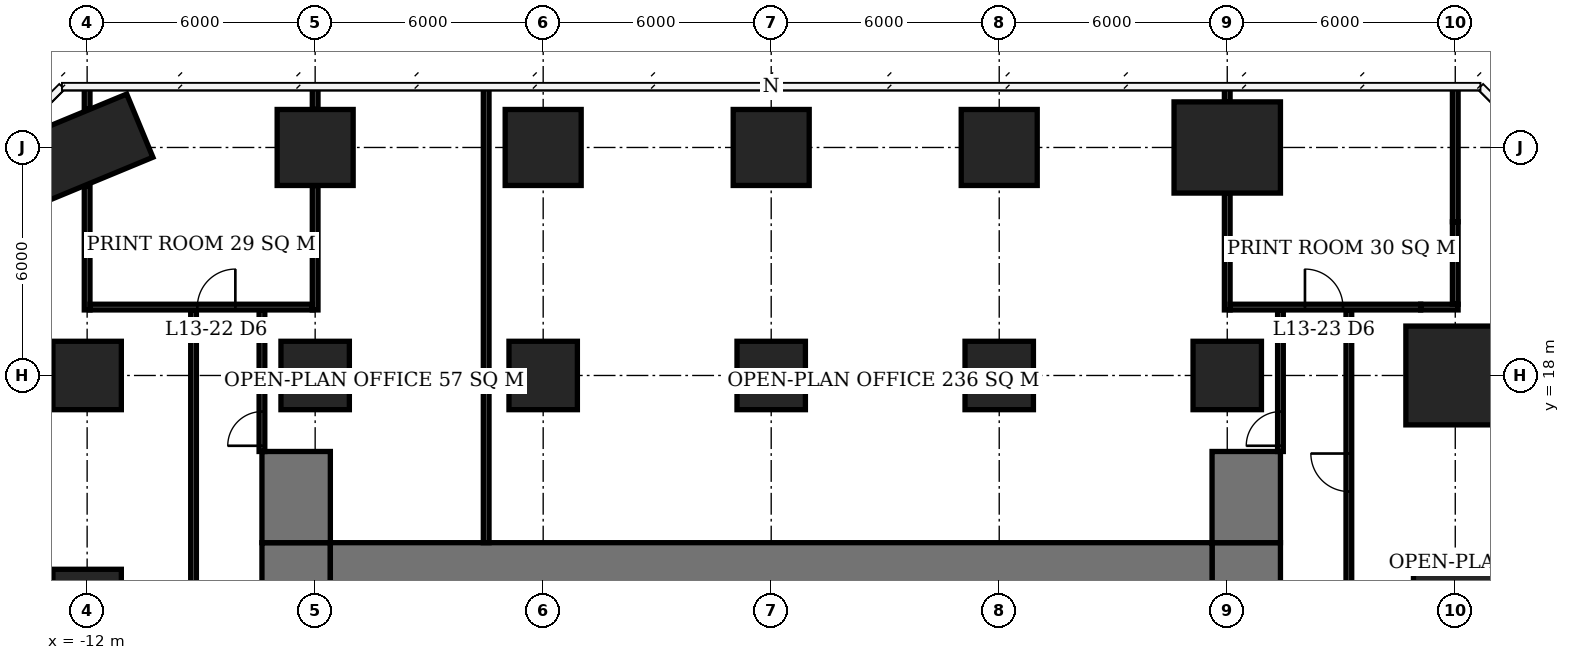
"""IFC4 building model, lengths in metres.
Left out: names, types, materials, properties, quantities, classifications, styles, units other than length and angle.
Written with IfcOpenShell. Run it as: python <this file> out.ifc"""

import sys

from ifc_helpers import new_model, si_unit, direction, frame, frame_2d, origin, origin_2d, place, context, subcontext, project, spatial, rectangle, extrude, element, fill, save


model = new_model("IFC4")
c1 = context("Model", 3, precision=1e-05, world=origin(), true_north=direction((0.0, 1.0)))
c2 = subcontext(c1, "Body", "Model", "MODEL_VIEW")
j1 = project(units=[si_unit("LENGTHUNIT", "METRE"), si_unit("PLANEANGLEUNIT", "RADIAN")], contexts=[c1])
p1 = place(None, origin())
s1 = spatial("IfcSite", under=j1, at=p1, CompositionType="ELEMENT")
p2 = place(p1, origin())
s2 = spatial("IfcBuilding", under=s1, at=p2, CompositionType="ELEMENT")
p3 = place(p2, frame((0.0, 0.0, 57.2)))
s3 = spatial("IfcBuildingStorey", under=s2, at=p3, CompositionType="ELEMENT", Elevation=57.2)
for number, where, z_axis, x_axis in (
    (1, (-12.0, 12.0, 0.0), (0.0, 0.0, 1.0), (1.0, 0.0, 0.0)),
    (2, (-12.0, 18.0, 0.0), (0.0, 0.0, 1.0), (1.0, 0.0, 0.0)),
):
    element("IfcColumn", number, at=place(p3, frame(where, z_axis=z_axis, x_axis=x_axis)), inside=s3, PredefinedType="COLUMN", context=c2, shape_type="SweptSolid", body=[
        extrude(rectangle(XDim=1.8, YDim=1.8, at=origin_2d()), origin(), (0.0, 0.0, 1.0), 3.9),
    ])
p4 = place(p3, frame((-12.0, 24.0, 0.0), z_axis=(0.0, 0.0, 1.0), x_axis=(0.923879532511, 0.382683432365, 0.0)))
e3 = element("IfcColumn", 3, at=p4, inside=s3, PredefinedType="COLUMN", context=c2, shape_type="SweptSolid", body=[
    extrude(rectangle(XDim=3.0, YDim=1.8, at=origin_2d()), origin(), (0.0, 0.0, 1.0), 3.9),
])
p5 = place(p3, frame((-6.0, 18.0, 0.0), z_axis=(0.0, 0.0, 1.0), x_axis=(1.0, 0.0, 0.0)))
e4 = element("IfcColumn", 4, at=p5, inside=s3, PredefinedType="COLUMN", context=c2, shape_type="SweptSolid", body=[
    extrude(rectangle(XDim=1.8, YDim=1.8, at=origin_2d()), origin(), (0.0, 0.0, 1.0), 3.9),
])
p6 = place(p3, frame((-6.0, 24.0, 0.0), z_axis=(0.0, 0.0, 1.0), x_axis=(1.0, 0.0, 0.0)))
e5 = element("IfcColumn", 5, at=p6, inside=s3, PredefinedType="COLUMN", context=c2, shape_type="SweptSolid", body=[
    extrude(rectangle(XDim=2.0, YDim=2.0, at=origin_2d()), origin(), (0.0, 0.0, 1.0), 3.9),
])
p7 = place(p3, frame((0.0, 18.0, 0.0), z_axis=(0.0, 0.0, 1.0), x_axis=(1.0, 0.0, 0.0)))
e6 = element("IfcColumn", 6, at=p7, inside=s3, PredefinedType="COLUMN", context=c2, shape_type="SweptSolid", body=[
    extrude(rectangle(XDim=1.8, YDim=1.8, at=origin_2d()), origin(), (0.0, 0.0, 1.0), 3.9),
])
p8 = place(p3, frame((0.0, 24.0, 0.0), z_axis=(0.0, 0.0, 1.0), x_axis=(1.0, 0.0, 0.0)))
e7 = element("IfcColumn", 7, at=p8, inside=s3, PredefinedType="COLUMN", context=c2, shape_type="SweptSolid", body=[
    extrude(rectangle(XDim=2.0, YDim=2.0, at=origin_2d()), origin(), (0.0, 0.0, 1.0), 3.9),
])
p9 = place(p3, frame((6.0, 18.0, 0.0), z_axis=(0.0, 0.0, 1.0), x_axis=(1.0, 0.0, 0.0)))
e8 = element("IfcColumn", 8, at=p9, inside=s3, PredefinedType="COLUMN", context=c2, shape_type="SweptSolid", body=[
    extrude(rectangle(XDim=1.8, YDim=1.8, at=origin_2d()), origin(), (0.0, 0.0, 1.0), 3.9),
])
p10 = place(p3, frame((6.0, 24.0, 0.0), z_axis=(0.0, 0.0, 1.0), x_axis=(1.0, 0.0, 0.0)))
e9 = element("IfcColumn", 9, at=p10, inside=s3, PredefinedType="COLUMN", context=c2, shape_type="SweptSolid", body=[
    extrude(rectangle(XDim=2.0, YDim=2.0, at=origin_2d()), origin(), (0.0, 0.0, 1.0), 3.9),
])
p11 = place(p3, frame((12.0, 18.0, 0.0), z_axis=(0.0, 0.0, 1.0), x_axis=(1.0, 0.0, 0.0)))
e10 = element("IfcColumn", 10, at=p11, inside=s3, PredefinedType="COLUMN", context=c2, shape_type="SweptSolid", body=[
    extrude(rectangle(XDim=1.8, YDim=1.8, at=origin_2d()), origin(), (0.0, 0.0, 1.0), 3.9),
])
p12 = place(p3, frame((12.0, 24.0, 0.0), z_axis=(0.0, 0.0, 1.0), x_axis=(1.0, 0.0, 0.0)))
e11 = element("IfcColumn", 11, at=p12, inside=s3, PredefinedType="COLUMN", context=c2, shape_type="SweptSolid", body=[
    extrude(rectangle(XDim=2.0, YDim=2.0, at=origin_2d()), origin(), (0.0, 0.0, 1.0), 3.9),
])
p13 = place(p3, frame((18.0, 18.0, 0.0), z_axis=(0.0, 0.0, 1.0), x_axis=(1.0, 0.0, 0.0)))
e12 = element("IfcColumn", 12, at=p13, inside=s3, PredefinedType="COLUMN", context=c2, shape_type="SweptSolid", body=[
    extrude(rectangle(XDim=1.8, YDim=1.8, at=origin_2d()), origin(), (0.0, 0.0, 1.0), 3.9),
])
p14 = place(p3, frame((18.0, 24.0, 0.0), z_axis=(0.0, 0.0, 1.0), x_axis=(1.0, 0.0, 0.0)))
e13 = element("IfcColumn", 13, at=p14, inside=s3, PredefinedType="COLUMN", context=c2, shape_type="SweptSolid", body=[
    extrude(rectangle(XDim=2.8, YDim=2.4, at=origin_2d()), origin(), (0.0, 0.0, 1.0), 3.9),
])
p15 = place(p3, frame((24.0, 12.0, 0.0), z_axis=(0.0, 0.0, 1.0), x_axis=(1.0, 0.0, 0.0)))
e14 = element("IfcColumn", 14, at=p15, inside=s3, PredefinedType="COLUMN", context=c2, shape_type="SweptSolid", body=[
    extrude(rectangle(XDim=2.2, YDim=2.2, at=origin_2d()), origin(), (0.0, 0.0, 1.0), 3.9),
])
p16 = place(p3, frame((24.0, 18.0, 0.0), z_axis=(0.0, 0.0, 1.0), x_axis=(1.0, 0.0, 0.0)))
e15 = element("IfcColumn", 15, at=p16, inside=s3, PredefinedType="COLUMN", context=c2, shape_type="SweptSolid", body=[
    extrude(rectangle(XDim=2.6, YDim=2.6, at=origin_2d()), origin(), (0.0, 0.0, 1.0), 3.9),
])
p17 = place(p3, frame((-5.6, 12.6, 0.0), z_axis=(0.0, 0.0, 1.0), x_axis=(1.0, 0.0, 0.0)))
e16 = element("IfcWall", 16, at=p17, inside=s3, PredefinedType="SHEAR", context=c2, shape_type="SweptSolid", body=[
    extrude(rectangle(XDim=23.2, YDim=2.0, at=frame_2d((11.6, 0.0))), origin(), (0.0, 0.0, 1.0), 3.9),
])
p18 = place(p3, frame((-6.5, -7.6, 0.0), z_axis=(0.0, 0.0, 1.0), x_axis=(0.0, 1.0, 0.0)))
e17 = element("IfcWall", 17, at=p18, inside=s3, PredefinedType="SHEAR", context=c2, shape_type="SweptSolid", body=[
    extrude(rectangle(XDim=21.2, YDim=1.8, at=frame_2d((10.6, 0.0))), origin(), (0.0, 0.0, 1.0), 3.9),
])
p19 = place(p18, frame((7.8, 0.0, 0.0)))
e18 = element("IfcOpeningElement", 18, at=p19, cuts=e17, PredefinedType="OPENING", context=c2, shape_type="SweptSolid", body=[
    extrude(rectangle(XDim=1.8, YDim=2.4, at=frame_2d((0.9, 1.2))), frame((0.0, 0.91, 0.0), z_axis=(0.0, -1.0, 0.0), x_axis=(1.0, 0.0, 0.0)), (0.0, 0.0, 1.0), 1.82),
])
p20 = place(p3, frame((18.5, -7.6, 0.0), z_axis=(0.0, 0.0, 1.0), x_axis=(0.0, 1.0, 0.0)))
e19 = element("IfcWall", 19, at=p20, inside=s3, PredefinedType="SHEAR", context=c2, shape_type="SweptSolid", body=[
    extrude(rectangle(XDim=21.2, YDim=1.8, at=frame_2d((10.6, 0.0))), origin(), (0.0, 0.0, 1.0), 3.9),
])
p21 = place(p20, frame((9.2, 0.0, 0.0)))
e20 = element("IfcOpeningElement", 20, at=p21, cuts=e19, PredefinedType="OPENING", context=c2, shape_type="SweptSolid", body=[
    extrude(rectangle(XDim=1.8, YDim=2.4, at=frame_2d((0.9, 1.2))), frame((0.0, 0.91, 0.0), z_axis=(0.0, -1.0, 0.0), x_axis=(1.0, 0.0, 0.0)), (0.0, 0.0, 1.0), 1.82),
])
for number, where, z_axis, x_axis in (
    (21, (-6.5, 13.6, 0.0), (0.0, 0.0, 1.0), (0.0, 1.0, 0.0)),
    (22, (18.5, 13.6, 0.0), (0.0, 0.0, 1.0), (0.0, 1.0, 0.0)),
):
    element("IfcWall", number, at=place(p3, frame(where, z_axis=z_axis, x_axis=x_axis)), inside=s3, PredefinedType="SHEAR", context=c2, shape_type="SweptSolid", body=[
        extrude(rectangle(XDim=2.4, YDim=1.8, at=frame_2d((1.2, 0.0))), origin(), (0.0, 0.0, 1.0), 3.9),
    ])
p22 = place(p3, frame((-11.925, 19.8, 0.0), z_axis=(0.0, 0.0, 1.0), x_axis=(1.0, 0.0, 0.0)))
e23 = element("IfcWall", 23, at=p22, inside=s3, PredefinedType="PARTITIONING", context=c2, shape_type="SweptSolid", body=[
    extrude(rectangle(XDim=5.85, YDim=0.15, at=frame_2d((2.925, 0.0))), origin(), (0.0, 0.0, 1.0), 3.65),
])
p23 = place(p22, frame((2.825, 0.0, 0.0)))
e24 = element("IfcOpeningElement", 24, at=p23, cuts=e23, PredefinedType="OPENING", context=c2, shape_type="SweptSolid", body=[
    extrude(rectangle(XDim=1.0, YDim=2.1, at=frame_2d((0.5, 1.05))), frame((0.0, 0.085, 0.0), z_axis=(0.0, -1.0, 0.0), x_axis=(1.0, 0.0, 0.0)), (0.0, 0.0, 1.0), 0.17),
])
p24 = place(p3, frame((18.075, 19.8, 0.0), z_axis=(0.0, 0.0, 1.0), x_axis=(1.0, 0.0, 0.0)))
e25 = element("IfcWall", 25, at=p24, inside=s3, PredefinedType="PARTITIONING", context=c2, shape_type="SweptSolid", body=[
    extrude(rectangle(XDim=5.015, YDim=0.15, at=frame_2d((2.508, 0.0))), origin(), (0.0, 0.0, 1.0), 3.65),
])
p25 = place(p24, frame((1.97, 0.0, 0.0)))
e26 = element("IfcOpeningElement", 26, at=p25, cuts=e25, PredefinedType="OPENING", context=c2, shape_type="SweptSolid", body=[
    extrude(rectangle(XDim=1.0, YDim=2.1, at=frame_2d((0.5, 1.05))), frame((0.0, 0.085, 0.0), z_axis=(0.0, -1.0, 0.0), x_axis=(1.0, 0.0, 0.0)), (0.0, 0.0, 1.0), 0.17),
])
p26 = place(p3, frame((23.09, 19.8, 0.0), z_axis=(0.0, 0.0, 1.0), x_axis=(1.0, 0.0, 0.0)))
e27 = element("IfcWall", 27, at=p26, inside=s3, PredefinedType="PARTITIONING", context=c2, shape_type="SweptSolid", body=[
    extrude(rectangle(XDim=0.985, YDim=0.15, at=frame_2d((0.492, 0.0))), origin(), (0.0, 0.0, 1.0), 2.65),
])
p27 = place(p3, frame((-12.0, 19.725, 0.0), z_axis=(0.0, 0.0, 1.0), x_axis=(0.0, 1.0, 0.0)))
e28 = element("IfcWall", 28, at=p27, inside=s3, PredefinedType="PARTITIONING", context=c2, shape_type="SweptSolid", body=[
    extrude(rectangle(XDim=3.27, YDim=0.15, at=frame_2d((1.635, 0.0))), origin(), (0.0, 0.0, 1.0), 3.65),
])
p28 = place(p3, frame((-12.0, 25.005, 0.0), z_axis=(0.0, 0.0, 1.0), x_axis=(0.0, 1.0, 0.0)))
e29 = element("IfcWall", 29, at=p28, inside=s3, PredefinedType="PARTITIONING", context=c2, shape_type="SweptSolid", body=[
    extrude(rectangle(XDim=0.595, YDim=0.15, at=frame_2d((0.297, 0.0))), origin(), (0.0, 0.0, 1.0), 3.65),
])
p29 = place(p3, frame((-6.0, 19.725, 0.0), z_axis=(0.0, 0.0, 1.0), x_axis=(0.0, 1.0, 0.0)))
e30 = element("IfcWall", 30, at=p29, inside=s3, PredefinedType="PARTITIONING", context=c2, shape_type="SweptSolid", body=[
    extrude(rectangle(XDim=3.275, YDim=0.15, at=frame_2d((1.637, 0.0))), origin(), (0.0, 0.0, 1.0), 3.65),
])
p30 = place(p3, frame((-6.0, 25.0, 0.0), z_axis=(0.0, 0.0, 1.0), x_axis=(0.0, 1.0, 0.0)))
e31 = element("IfcWall", 31, at=p30, inside=s3, PredefinedType="PARTITIONING", context=c2, shape_type="SweptSolid", body=[
    extrude(rectangle(XDim=0.6, YDim=0.15, at=frame_2d((0.3, 0.0))), origin(), (0.0, 0.0, 1.0), 3.65),
])
p31 = place(p3, frame((18.0, 19.725, 0.0), z_axis=(0.0, 0.0, 1.0), x_axis=(0.0, 1.0, 0.0)))
e32 = element("IfcWall", 32, at=p31, inside=s3, PredefinedType="PARTITIONING", context=c2, shape_type="SweptSolid", body=[
    extrude(rectangle(XDim=3.075, YDim=0.15, at=frame_2d((1.538, 0.0))), origin(), (0.0, 0.0, 1.0), 3.65),
])
p32 = place(p3, frame((18.0, 25.2, 0.0), z_axis=(0.0, 0.0, 1.0), x_axis=(0.0, 1.0, 0.0)))
e33 = element("IfcWall", 33, at=p32, inside=s3, PredefinedType="PARTITIONING", context=c2, shape_type="SweptSolid", body=[
    extrude(rectangle(XDim=0.4, YDim=0.15, at=frame_2d((0.2, 0.0))), origin(), (0.0, 0.0, 1.0), 3.65),
])
p33 = place(p3, frame((24.0, 19.875, 0.0), z_axis=(0.0, 0.0, 1.0), x_axis=(0.0, 1.0, 0.0)))
e34 = element("IfcWall", 34, at=p33, inside=s3, PredefinedType="PARTITIONING", context=c2, shape_type="SweptSolid", body=[
    extrude(rectangle(XDim=2.17, YDim=0.15, at=frame_2d((1.085, 0.0))), origin(), (0.0, 0.0, 1.0), 2.65),
])
p34 = place(p3, frame((24.0, 22.045, 0.0), z_axis=(0.0, 0.0, 1.0), x_axis=(0.0, 1.0, 0.0)))
e35 = element("IfcWall", 35, at=p34, inside=s3, PredefinedType="PARTITIONING", context=c2, shape_type="SweptSolid", body=[
    extrude(rectangle(XDim=3.555, YDim=0.15, at=frame_2d((1.778, 0.0))), origin(), (0.0, 0.0, 1.0), 3.65),
])
p35 = place(p3, frame((-9.2, -4.425, 0.0), z_axis=(0.0, 0.0, 1.0), x_axis=(0.0, 1.0, 0.0)))
e36 = element("IfcWall", 36, at=p35, inside=s3, PredefinedType="PARTITIONING", context=c2, shape_type="SweptSolid", body=[
    extrude(rectangle(XDim=24.15, YDim=0.15, at=frame_2d((12.075, 0.0))), origin(), (0.0, 0.0, 1.0), 3.65),
])
p36 = place(p35, frame((15.171, 0.0, 0.0)))
e37 = element("IfcOpeningElement", 37, at=p36, cuts=e36, PredefinedType="OPENING", context=c2, shape_type="SweptSolid", body=[
    extrude(rectangle(XDim=1.0, YDim=2.1, at=frame_2d((0.5, 1.05))), frame((0.0, 0.085, 0.0), z_axis=(0.0, -1.0, 0.0), x_axis=(1.0, 0.0, 0.0)), (0.0, 0.0, 1.0), 0.17),
])
p37 = place(p3, frame((-7.4, 16.0, 0.0), z_axis=(0.0, 0.0, 1.0), x_axis=(0.0, 1.0, 0.0)))
e38 = element("IfcWall", 38, at=p37, inside=s3, PredefinedType="PARTITIONING", context=c2, shape_type="SweptSolid", body=[
    extrude(rectangle(XDim=3.725, YDim=0.15, at=frame_2d((1.863, 0.0))), origin(), (0.0, 0.0, 1.0), 3.65),
])
p38 = place(p37, frame((0.15, 0.0, 0.0)))
e39 = element("IfcOpeningElement", 39, at=p38, cuts=e38, PredefinedType="OPENING", context=c2, shape_type="SweptSolid", body=[
    extrude(rectangle(XDim=0.9, YDim=2.1, at=frame_2d((0.45, 1.05))), frame((0.0, 0.085, 0.0), z_axis=(0.0, -1.0, 0.0), x_axis=(1.0, 0.0, 0.0)), (0.0, 0.0, 1.0), 0.17),
])
p39 = place(p3, frame((-1.5, 13.6, 0.0), z_axis=(0.0, 0.0, 1.0), x_axis=(0.0, 1.0, 0.0)))
e40 = element("IfcWall", 40, at=p39, inside=s3, PredefinedType="PARTITIONING", context=c2, shape_type="SweptSolid", body=[
    extrude(rectangle(XDim=12.0, YDim=0.15, at=frame_2d((6.0, 0.0))), origin(), (0.0, 0.0, 1.0), 3.65),
])
p40 = place(p3, frame((19.4, 16.0, 0.0), z_axis=(0.0, 0.0, 1.0), x_axis=(0.0, 1.0, 0.0)))
e41 = element("IfcWall", 41, at=p40, inside=s3, PredefinedType="PARTITIONING", context=c2, shape_type="SweptSolid", body=[
    extrude(rectangle(XDim=3.725, YDim=0.15, at=frame_2d((1.863, 0.0))), origin(), (0.0, 0.0, 1.0), 3.65),
])
p41 = place(p40, frame((0.15, 0.0, 0.0)))
e42 = element("IfcOpeningElement", 42, at=p41, cuts=e41, PredefinedType="OPENING", context=c2, shape_type="SweptSolid", body=[
    extrude(rectangle(XDim=0.9, YDim=2.1, at=frame_2d((0.45, 1.05))), frame((0.0, 0.085, 0.0), z_axis=(0.0, -1.0, 0.0), x_axis=(1.0, 0.0, 0.0)), (0.0, 0.0, 1.0), 0.17),
])
p42 = place(p3, frame((21.2, 7.575, 0.0), z_axis=(0.0, 0.0, 1.0), x_axis=(0.0, 1.0, 0.0)))
e43 = element("IfcWall", 43, at=p42, inside=s3, PredefinedType="PARTITIONING", context=c2, shape_type="SweptSolid", body=[
    extrude(rectangle(XDim=12.15, YDim=0.15, at=frame_2d((6.075, 0.0))), origin(), (0.0, 0.0, 1.0), 3.65),
])
p43 = place(p42, frame((7.371, 0.0, 0.0)))
e44 = element("IfcOpeningElement", 44, at=p43, cuts=e43, PredefinedType="OPENING", context=c2, shape_type="SweptSolid", body=[
    extrude(rectangle(XDim=1.0, YDim=2.1, at=frame_2d((0.5, 1.05))), frame((0.0, 0.085, 0.0), z_axis=(0.0, -1.0, 0.0), x_axis=(1.0, 0.0, 0.0)), (0.0, 0.0, 1.0), 0.17),
])
p44 = place(p23, origin())
e45 = element("IfcDoor", 45, at=p44, inside=s3, OperationType="SINGLE_SWING_RIGHT", PredefinedType="DOOR", context=c2, shape_type="SweptSolid", body=[
    extrude(rectangle(XDim=1.0, YDim=2.1, at=frame_2d((0.5, 1.05))), frame((0.0, 0.025, 0.0), z_axis=(0.0, -1.0, 0.0), x_axis=(1.0, 0.0, 0.0)), (0.0, 0.0, 1.0), 0.05),
])
fill(e24, e45)
p45 = place(p25, origin())
e46 = element("IfcDoor", 46, at=p45, inside=s3, OperationType="SINGLE_SWING_LEFT", PredefinedType="DOOR", context=c2, shape_type="SweptSolid", body=[
    extrude(rectangle(XDim=1.0, YDim=2.1, at=frame_2d((0.5, 1.05))), frame((0.0, 0.025, 0.0), z_axis=(0.0, -1.0, 0.0), x_axis=(1.0, 0.0, 0.0)), (0.0, 0.0, 1.0), 0.05),
])
fill(e26, e46)
p46 = place(p43, origin())
e47 = element("IfcDoor", 47, at=p46, inside=s3, OperationType="SINGLE_SWING_RIGHT", PredefinedType="DOOR", context=c2, shape_type="SweptSolid", body=[
    extrude(rectangle(XDim=1.0, YDim=2.1, at=frame_2d((0.5, 1.05))), frame((0.0, 0.025, 0.0), z_axis=(0.0, -1.0, 0.0), x_axis=(1.0, 0.0, 0.0)), (0.0, 0.0, 1.0), 0.05),
])
fill(e44, e47)
p47 = place(p38, origin())
e48 = element("IfcDoor", 48, at=p47, inside=s3, OperationType="SINGLE_SWING_LEFT", PredefinedType="DOOR", context=c2, shape_type="SweptSolid", body=[
    extrude(rectangle(XDim=0.9, YDim=2.1, at=frame_2d((0.45, 1.05))), frame((0.0, 0.025, 0.0), z_axis=(0.0, -1.0, 0.0), x_axis=(1.0, 0.0, 0.0)), (0.0, 0.0, 1.0), 0.05),
])
fill(e39, e48)
p48 = place(p41, origin())
e49 = element("IfcDoor", 49, at=p48, inside=s3, OperationType="SINGLE_SWING_LEFT", PredefinedType="DOOR", context=c2, shape_type="SweptSolid", body=[
    extrude(rectangle(XDim=0.9, YDim=2.1, at=frame_2d((0.45, 1.05))), frame((0.0, 0.025, 0.0), z_axis=(0.0, -1.0, 0.0), x_axis=(1.0, 0.0, 0.0)), (0.0, 0.0, 1.0), 0.05),
])
fill(e42, e49)
save(model, sys.argv[1])
